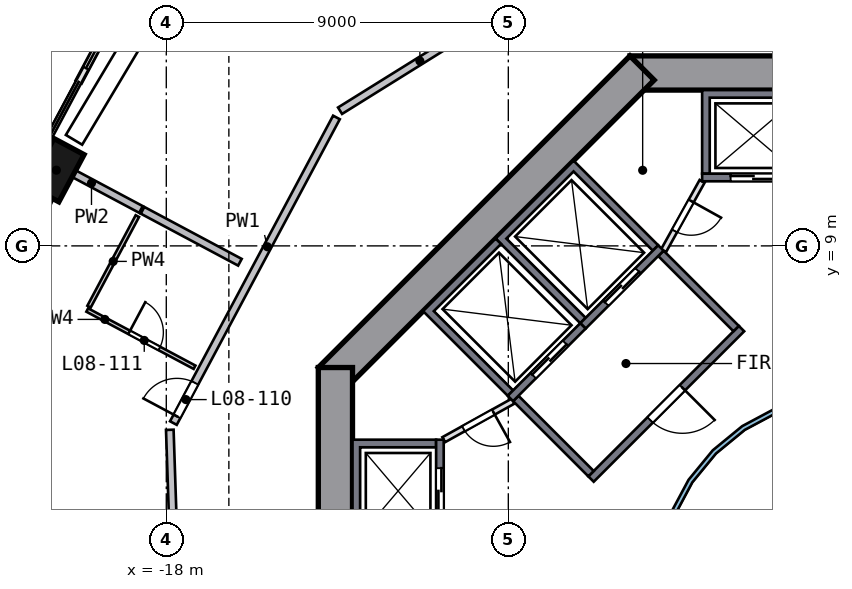
"""IFC4 building model, lengths in metres.
Left out: names, types, materials, properties, quantities, classifications, styles, units other than length and angle.
Written with IfcOpenShell. Run it as: python <this file> out.ifc"""

import sys

from ifc_helpers import new_model, si_unit, direction, frame, frame_2d, origin, origin_2d, place, context, subcontext, project, spatial, polyline, rectangle, outline, extrude, element, fill, save


model = new_model("IFC4")
c1 = context("Model", 3, precision=1e-05, world=origin(), true_north=direction((0.0, 1.0)))
c2 = subcontext(c1, "Body", "Model", "MODEL_VIEW")
j1 = project(units=[si_unit("LENGTHUNIT", "METRE"), si_unit("PLANEANGLEUNIT", "RADIAN")], contexts=[c1])
p1 = place(None, origin())
s1 = spatial("IfcSite", under=j1, at=p1, CompositionType="ELEMENT")
p2 = place(p1, origin())
s2 = spatial("IfcBuilding", under=s1, at=p2, CompositionType="ELEMENT")
p3 = place(p2, frame((0.0, 0.0, 42.5)))
s3 = spatial("IfcBuildingStorey", under=s2, at=p3, CompositionType="ELEMENT", Elevation=42.5)
p4 = place(p3, frame((-20.829, 11.113, 0.0), z_axis=(-0.052094183, -0.099549321, 0.993668017), x_axis=(-0.468171177, -0.876466072, -0.112352009)))
e1 = element("IfcColumn", 1, at=p4, inside=s3, PredefinedType="COLUMN", context=c2, shape_type="SweptSolid", body=[
    extrude(rectangle(XDim=1.4, YDim=0.9, at=origin_2d()), origin(), (0.0, 0.0, 1.0), 3.21),
])
p5 = place(p3, frame((5.799, 13.55, 0.0), z_axis=(0.0, 0.0, 1.0), x_axis=(-1.0, 0.0, 0.0)))
e2 = element("IfcWall", 2, at=p5, inside=s3, PredefinedType="SHEAR", context=c2, shape_type="SweptSolid", body=[
    extrude(rectangle(XDim=11.598, YDim=0.9, at=frame_2d((5.799, 0.0))), origin(), (0.0, 0.0, 1.0), 3.5),
])
p6 = place(p5, frame((4.899, 0.0, 0.0)))
e3 = element("IfcOpeningElement", 3, at=p6, cuts=e2, PredefinedType="OPENING", context=c2, shape_type="SweptSolid", body=[
    extrude(rectangle(XDim=1.8, YDim=2.1, at=frame_2d((0.9, 1.05))), frame((0.0, 0.46, 0.0), z_axis=(0.0, -1.0, 0.0), x_axis=(1.0, 0.0, 0.0)), (0.0, 0.0, 1.0), 0.92),
])
p7 = place(p3, frame((-5.481, 13.682, 0.0), z_axis=(0.0, 0.0, 1.0), x_axis=(-0.707106781, -0.707106781, 0.0)))
e4 = element("IfcWall", 4, at=p7, inside=s3, PredefinedType="SHEAR", context=c2, shape_type="SweptSolid", body=[
    extrude(rectangle(XDim=11.598, YDim=0.9, at=frame_2d((5.799, 0.0))), origin(), (0.0, 0.0, 1.0), 3.5),
])
p8 = place(p3, frame((-13.55, 5.799, 0.0), z_axis=(0.0, 0.0, 1.0), x_axis=(0.0, -1.0, 0.0)))
e5 = element("IfcWall", 5, at=p8, inside=s3, PredefinedType="SHEAR", context=c2, shape_type="SweptSolid", body=[
    extrude(rectangle(XDim=11.598, YDim=0.9, at=frame_2d((5.799, 0.0))), origin(), (0.0, 0.0, 1.0), 3.5),
])
p9 = place(p8, frame((4.899, 0.0, 0.0)))
e6 = element("IfcOpeningElement", 6, at=p9, cuts=e5, PredefinedType="OPENING", context=c2, shape_type="SweptSolid", body=[
    extrude(rectangle(XDim=1.8, YDim=2.1, at=frame_2d((0.9, 1.05))), frame((0.0, 0.46, 0.0), z_axis=(0.0, -1.0, 0.0), x_axis=(1.0, 0.0, 0.0)), (0.0, 0.0, 1.0), 0.92),
])
p10 = place(p3, frame((-18.324, 17.03, 0.0), z_axis=(0.0, 0.0, 1.0), x_axis=(-0.470687824, -0.88229982, 0.0)))
e7 = element("IfcWall", 7, at=p10, inside=s3, PredefinedType="SOLIDWALL", context=c2, shape_type="SweptSolid", body=[
    extrude(rectangle(XDim=4.199, YDim=0.15, at=frame_2d((2.099, 0.0))), origin(), (0.0, 0.0, 1.0), 2.425),
])
p11 = place(p10, frame((1.399, 0.0, 0.0)))
e8 = element("IfcOpeningElement", 8, at=p11, cuts=e7, PredefinedType="OPENING", context=c2, shape_type="SweptSolid", body=[
    extrude(rectangle(XDim=2.4, YDim=2.4, at=frame_2d((1.2, 1.2))), frame((0.0, 0.085, 0.0), z_axis=(0.0, -1.0, 0.0), x_axis=(1.0, 0.0, 0.0)), (0.0, 0.0, 1.0), 0.17),
])
p12 = place(p3, frame((-21.181, 18.101, 0.0), z_axis=(0.0, 0.0, 1.0), x_axis=(-0.470704182, -0.882291093, 0.0)))
e9 = element("IfcWall", 9, at=p12, inside=s3, PredefinedType="SOLIDWALL", context=c2, shape_type="SweptSolid", body=[
    extrude(rectangle(XDim=13.224, YDim=0.5, at=frame_2d((6.612, 0.0))), origin(), (0.0, 0.0, 1.0), 0.7),
])
p13 = place(p3, origin())
e10 = element("IfcWall", 10, at=p13, inside=s3, PredefinedType="SOLIDWALL", context=c2, shape_type="SweptSolid", body=[
    extrude(outline(polyline([(-3.9, 10.9), (-3.9, 13.1), (-1.2, 13.1), (-1.2, 10.9), (-1.4, 10.9), (-1.4, 12.9), (-3.7, 12.9), (-3.7, 10.9), (-3.9, 10.9)])), origin(), (0.0, 0.0, 1.0), 3.19),
])
p14 = place(p3, frame((-1.2, 10.8, 0.0), z_axis=(0.0, 0.0, 1.0), x_axis=(-1.0, 0.0, 0.0)))
e11 = element("IfcWall", 11, at=p14, inside=s3, PredefinedType="SOLIDWALL", context=c2, shape_type="SweptSolid", body=[
    extrude(rectangle(XDim=2.7, YDim=0.2, at=frame_2d((1.35, 0.0))), origin(), (0.0, 0.0, 1.0), 3.19),
])
p15 = place(p14, frame((0.75, 0.0, 0.0)))
e12 = element("IfcOpeningElement", 12, at=p15, cuts=e11, PredefinedType="OPENING", context=c2, shape_type="SweptSolid", body=[
    extrude(rectangle(XDim=1.2, YDim=2.1, at=frame_2d((0.6, 1.05))), frame((0.0, 0.11, 0.0), z_axis=(0.0, -1.0, 0.0), x_axis=(1.0, 0.0, 0.0)), (0.0, 0.0, 1.0), 0.22),
])
p16 = place(p3, origin())
e13 = element("IfcWall", 13, at=p16, inside=s3, PredefinedType="SOLIDWALL", context=c2, shape_type="SweptSolid", body=[
    extrude(outline(polyline([(-13.1, 3.9), (-10.9, 3.9), (-10.9, 3.7), (-12.9, 3.7), (-12.9, 1.4), (-10.9, 1.4), (-10.9, 1.2), (-13.1, 1.2), (-13.1, 3.9)])), origin(), (0.0, 0.0, 1.0), 3.19),
])
p17 = place(p3, frame((-10.8, 1.2, 0.0), z_axis=(0.0, 0.0, 1.0), x_axis=(0.0, 1.0, 0.0)))
e14 = element("IfcWall", 14, at=p17, inside=s3, PredefinedType="SOLIDWALL", context=c2, shape_type="SweptSolid", body=[
    extrude(rectangle(XDim=2.7, YDim=0.2, at=frame_2d((1.35, 0.0))), origin(), (0.0, 0.0, 1.0), 3.19),
])
p18 = place(p17, frame((0.75, 0.0, 0.0)))
e15 = element("IfcOpeningElement", 15, at=p18, cuts=e14, PredefinedType="OPENING", context=c2, shape_type="SweptSolid", body=[
    extrude(rectangle(XDim=1.2, YDim=2.1, at=frame_2d((0.6, 1.05))), frame((0.0, 0.11, 0.0), z_axis=(0.0, -1.0, 0.0), x_axis=(1.0, 0.0, 0.0)), (0.0, 0.0, 1.0), 0.22),
])
p19 = place(p3, origin())
e16 = element("IfcWall", 16, at=p19, inside=s3, PredefinedType="SOLIDWALL", context=c2, shape_type="SweptSolid", body=[
    extrude(outline(polyline([(-9.334, 9.192), (-7.283, 11.243), (-5.056, 9.016), (-5.197, 8.874), (-7.283, 10.96), (-9.051, 9.192), (-6.965, 7.106), (-7.106, 6.965), (-9.334, 9.192)])), origin(), (0.0, 0.0, 1.0), 3.19),
])
p20 = place(p3, frame((-4.985, 8.945, 0.0), z_axis=(0.0, 0.0, 1.0), x_axis=(-0.707106781, -0.707106781, 0.0)))
e17 = element("IfcWall", 17, at=p20, inside=s3, PredefinedType="SOLIDWALL", context=c2, shape_type="SweptSolid", body=[
    extrude(rectangle(XDim=2.9, YDim=0.2, at=frame_2d((1.45, 0.0))), origin(), (0.0, 0.0, 1.0), 3.19),
])
p21 = place(p20, frame((0.85, 0.0, 0.0)))
e18 = element("IfcOpeningElement", 18, at=p21, cuts=e17, PredefinedType="OPENING", context=c2, shape_type="SweptSolid", body=[
    extrude(rectangle(XDim=1.2, YDim=2.1, at=frame_2d((0.6, 1.05))), frame((0.0, 0.11, 0.0), z_axis=(0.0, -1.0, 0.0), x_axis=(1.0, 0.0, 0.0)), (0.0, 0.0, 1.0), 0.22),
])
p22 = place(p3, origin())
e19 = element("IfcWall", 19, at=p22, inside=s3, PredefinedType="SOLIDWALL", context=c2, shape_type="SweptSolid", body=[
    extrude(outline(polyline([(-11.243, 7.283), (-9.334, 9.192), (-9.192, 9.051), (-10.96, 7.283), (-8.874, 5.197), (-9.016, 5.056), (-11.243, 7.283)])), origin(), (0.0, 0.0, 1.0), 3.19),
])
p23 = place(p3, frame((-7.036, 6.894, 0.0), z_axis=(0.0, 0.0, 1.0), x_axis=(-0.707106781, -0.707106781, 0.0)))
e20 = element("IfcWall", 20, at=p23, inside=s3, PredefinedType="SOLIDWALL", context=c2, shape_type="SweptSolid", body=[
    extrude(rectangle(XDim=2.7, YDim=0.2, at=frame_2d((1.35, 0.0))), origin(), (0.0, 0.0, 1.0), 3.19),
])
p24 = place(p23, frame((0.65, 0.0, 0.0)))
e21 = element("IfcOpeningElement", 21, at=p24, cuts=e20, PredefinedType="OPENING", context=c2, shape_type="SweptSolid", body=[
    extrude(rectangle(XDim=1.2, YDim=2.1, at=frame_2d((0.6, 1.05))), frame((0.0, 0.11, 0.0), z_axis=(0.0, -1.0, 0.0), x_axis=(1.0, 0.0, 0.0)), (0.0, 0.0, 1.0), 0.22),
])
p25 = place(p3, frame((-2.864, 6.823, 0.0), z_axis=(0.0, 0.0, 1.0), x_axis=(-0.707106781, -0.707106781, 0.0)))
e22 = element("IfcWall", 22, at=p25, inside=s3, PredefinedType="SOLIDWALL", context=c2, shape_type="SweptSolid", body=[
    extrude(rectangle(XDim=5.6, YDim=0.2, at=frame_2d((2.8, 0.0))), origin(), (0.0, 0.0, 1.0), 3.19),
])
p26 = place(p25, frame((2.2, 0.0, 0.0)))
e23 = element("IfcOpeningElement", 23, at=p26, cuts=e22, PredefinedType="OPENING", context=c2, shape_type="SweptSolid", body=[
    extrude(rectangle(XDim=1.2, YDim=2.1, at=frame_2d((0.6, 1.05))), frame((0.0, 0.11, 0.0), z_axis=(0.0, -1.0, 0.0), x_axis=(1.0, 0.0, 0.0)), (0.0, 0.0, 1.0), 0.22),
])
for number, where, z_axis, x_axis in (
    (24, (-3.005, 6.823, 0.0), (0.0, 0.0, 1.0), (-0.707, 0.707, 0.0)),
    (25, (-6.823, 3.005, 0.0), (0.0, 0.0, 1.0), (-0.707, 0.707, 0.0)),
):
    element("IfcWall", number, at=place(p3, frame(where, z_axis=z_axis, x_axis=x_axis)), inside=s3, PredefinedType="SOLIDWALL", context=c2, shape_type="SweptSolid", body=[
        extrude(rectangle(XDim=2.8, YDim=0.2, at=frame_2d((1.4, 0.0))), origin(), (0.0, 0.0, 1.0), 3.19),
    ])
p27 = place(p3, frame((-3.9, 10.7, 0.0), z_axis=(0.0, 0.0, 1.0), x_axis=(-0.485692555, -0.874129705, 0.0)))
e26 = element("IfcWall", 26, at=p27, inside=s3, PredefinedType="PARTITIONING", context=c2, shape_type="SweptSolid", body=[
    extrude(rectangle(XDim=2.089, YDim=0.15, at=frame_2d((1.044, 0.0))), origin(), (0.0, 0.0, 1.0), 3.19),
])
p28 = place(p27, frame((0.594, 0.0, 0.0)))
e27 = element("IfcOpeningElement", 27, at=p28, cuts=e26, PredefinedType="OPENING", context=c2, shape_type="SweptSolid", body=[
    extrude(rectangle(XDim=0.9, YDim=2.1, at=frame_2d((0.45, 1.05))), frame((0.0, 0.085, 0.0), z_axis=(0.0, -1.0, 0.0), x_axis=(1.0, 0.0, 0.0)), (0.0, 0.0, 1.0), 0.17),
])
p29 = place(p3, frame((-8.874, 4.914, 0.0), z_axis=(0.0, 0.0, 1.0), x_axis=(-0.874129705, -0.485692555, 0.0)))
e28 = element("IfcWall", 28, at=p29, inside=s3, PredefinedType="PARTITIONING", context=c2, shape_type="SweptSolid", body=[
    extrude(rectangle(XDim=2.089, YDim=0.15, at=frame_2d((1.044, 0.0))), origin(), (0.0, 0.0, 1.0), 3.19),
])
p30 = place(p29, frame((0.594, 0.0, 0.0)))
e29 = element("IfcOpeningElement", 29, at=p30, cuts=e28, PredefinedType="OPENING", context=c2, shape_type="SweptSolid", body=[
    extrude(rectangle(XDim=0.9, YDim=2.1, at=frame_2d((0.45, 1.05))), frame((0.0, 0.085, 0.0), z_axis=(0.0, -1.0, 0.0), x_axis=(1.0, 0.0, 0.0)), (0.0, 0.0, 1.0), 0.17),
])
p31 = place(p3, origin())
e30 = element("IfcWall", 30, at=p31, inside=s3, PredefinedType="SOLIDWALL", context=c2, shape_type="SweptSolid", body=[
    extrude(outline(polyline([(5.021, -0.999), (4.73, -1.959), (4.257, -2.844), (3.62, -3.62), (2.844, -4.257), (1.959, -4.73), (0.999, -5.021), (0.0, -5.12), (-0.999, -5.021), (-1.959, -4.73), (-2.844, -4.257), (-3.62, -3.62), (-4.257, -2.844), (-4.73, -1.959), (-5.021, -0.999), (-5.12, 0.0), (-5.021, 0.999), (-4.73, 1.959), (-4.257, 2.844), (-3.62, 3.62), (-2.844, 4.257), (-1.959, 4.73), (-0.999, 5.021), (0.0, 5.12), (0.999, 5.021), (1.959, 4.73), (2.844, 4.257), (3.62, 3.62), (4.257, 2.844), (4.73, 1.959), (5.021, 0.999), (5.12, 0.0), (5.021, -0.999)]), holes=[polyline([(4.904, 0.976), (4.619, 1.913), (4.157, 2.778), (3.535, 3.535), (2.778, 4.157), (1.913, 4.619), (0.976, 4.904), (0.0, 5.0), (-0.976, 4.904), (-1.913, 4.619), (-2.778, 4.157), (-3.535, 3.535), (-4.157, 2.778), (-4.619, 1.913), (-4.904, 0.976), (-5.0, 0.0), (-4.904, -0.976), (-4.619, -1.913), (-4.157, -2.778), (-3.535, -3.535), (-2.778, -4.157), (-1.913, -4.619), (-0.976, -4.904), (0.0, -5.0), (0.976, -4.904), (1.913, -4.619), (2.778, -4.157), (3.535, -3.535), (4.157, -2.778), (4.619, -1.913), (4.904, -0.976), (5.0, 0.0), (4.904, 0.976)])]), origin(), (0.0, 0.0, 1.0), 3.19),
])
p32 = place(p3, frame((-17.908, 4.16, 0.0), z_axis=(0.0, 0.0, 1.0), x_axis=(0.033506179, -0.99943851, 0.0)))
e31 = element("IfcWall", 31, at=p32, inside=s3, PredefinedType="SOLIDWALL", context=c2, shape_type="SweptSolid", body=[
    extrude(rectangle(XDim=9.516, YDim=0.2, at=frame_2d((4.758, 0.0))), origin(), (0.0, 0.0, 1.0), 3.19),
])
p33 = place(p3, frame((-17.813, 4.338, 0.0), z_axis=(0.0, 0.0, 1.0), x_axis=(0.470711952, 0.882286948, 0.0)))
e32 = element("IfcWall", 32, at=p33, inside=s3, PredefinedType="SOLIDWALL", context=c2, shape_type="SweptSolid", body=[
    extrude(rectangle(XDim=9.115, YDim=0.2, at=frame_2d((4.558, 0.0))), origin(), (0.0, 0.0, 1.0), 3.19),
])
p34 = place(p33, frame((0.2, 0.0, 0.0)))
e33 = element("IfcOpeningElement", 33, at=p34, cuts=e32, PredefinedType="OPENING", context=c2, shape_type="SweptSolid", body=[
    extrude(rectangle(XDim=1.0, YDim=2.1, at=frame_2d((0.5, 1.05))), frame((0.0, 0.11, 0.0), z_axis=(0.0, -1.0, 0.0), x_axis=(1.0, 0.0, 0.0)), (0.0, 0.0, 1.0), 0.22),
])
p35 = place(p3, frame((-13.428, 12.557, 0.0), z_axis=(0.0, 0.0, 1.0), x_axis=(0.848780633, 0.528745154, 0.0)))
e34 = element("IfcWall", 34, at=p35, inside=s3, PredefinedType="SOLIDWALL", context=c2, shape_type="SweptSolid", body=[
    extrude(rectangle(XDim=9.316, YDim=0.2, at=frame_2d((4.658, 0.0))), origin(), (0.0, 0.0, 1.0), 3.19),
])
p36 = place(p35, frame((5.15, 0.0, 0.0)))
e35 = element("IfcOpeningElement", 35, at=p36, cuts=e34, PredefinedType="OPENING", context=c2, shape_type="SweptSolid", body=[
    extrude(rectangle(XDim=1.0, YDim=2.1, at=frame_2d((0.5, 1.05))), frame((0.0, 0.11, 0.0), z_axis=(0.0, -1.0, 0.0), x_axis=(1.0, 0.0, 0.0)), (0.0, 0.0, 1.0), 0.22),
])
p37 = place(p3, frame((-18.666, 9.958, 0.0), z_axis=(0.0, 0.0, 1.0), x_axis=(-0.882304858, 0.470678379, 0.0)))
e36 = element("IfcWall", 36, at=p37, inside=s3, PredefinedType="SOLIDWALL", context=c2, shape_type="SweptSolid", body=[
    extrude(rectangle(XDim=2.952, YDim=0.2, at=frame_2d((1.476, 0.0))), origin(), (0.0, 0.0, 1.0), 3.19),
])
p38 = place(p3, frame((-16.062, 8.569, 0.0), z_axis=(0.0, 0.0, 1.0), x_axis=(-0.882280811, 0.470723454, 0.0)))
e37 = element("IfcWall", 37, at=p38, inside=s3, PredefinedType="SOLIDWALL", context=c2, shape_type="SweptSolid", body=[
    extrude(rectangle(XDim=2.905, YDim=0.2, at=frame_2d((1.453, 0.0))), origin(), (0.0, 0.0, 1.0), 3.19),
])
p39 = place(p3, frame((-20.033, 7.401, 0.0), z_axis=(0.0, 0.0, 1.0), x_axis=(0.470710247, 0.882287858, 0.0)))
e38 = element("IfcWall", 38, at=p39, inside=s3, PredefinedType="PARTITIONING", context=c2, shape_type="SweptSolid", body=[
    extrude(rectangle(XDim=2.7, YDim=0.1, at=frame_2d((1.35, 0.0))), origin(), (0.0, 0.0, 1.0), 3.19),
])
p40 = place(p3, frame((-20.08, 7.312, 0.0), z_axis=(0.0, 0.0, 1.0), x_axis=(0.882272674, -0.470738706, 0.0)))
e39 = element("IfcWall", 39, at=p40, inside=s3, PredefinedType="PARTITIONING", context=c2, shape_type="SweptSolid", body=[
    extrude(rectangle(XDim=3.2, YDim=0.1, at=frame_2d((1.6, 0.0))), origin(), (0.0, 0.0, 1.0), 3.19),
])
p41 = place(p40, frame((1.25, 0.0, 0.0)))
e40 = element("IfcOpeningElement", 40, at=p41, cuts=e39, PredefinedType="OPENING", context=c2, shape_type="SweptSolid", body=[
    extrude(rectangle(XDim=0.9, YDim=2.1, at=frame_2d((0.45, 1.05))), frame((0.0, 0.06, 0.0), z_axis=(0.0, -1.0, 0.0), x_axis=(1.0, 0.0, 0.0)), (0.0, 0.0, 1.0), 0.12),
])
p42 = place(p11, origin())
e41 = element("IfcDoor", 41, at=p42, inside=s3, OperationType="SLIDING_TO_LEFT", PredefinedType="DOOR", context=c2, shape_type="SweptSolid", body=[
    extrude(rectangle(XDim=2.4, YDim=2.4, at=frame_2d((1.2, 1.2))), frame((0.0, 0.025, 0.0), z_axis=(0.0, -1.0, 0.0), x_axis=(1.0, 0.0, 0.0)), (0.0, 0.0, 1.0), 0.05),
])
fill(e8, e41)
p43 = place(p15, origin())
e42 = element("IfcDoor", 42, at=p43, inside=s3, OperationType="DOUBLE_DOOR_SLIDING", PredefinedType="DOOR", context=c2, shape_type="SweptSolid", body=[
    extrude(rectangle(XDim=1.2, YDim=2.1, at=frame_2d((0.6, 1.05))), frame((0.0, 0.025, 0.0), z_axis=(0.0, -1.0, 0.0), x_axis=(1.0, 0.0, 0.0)), (0.0, 0.0, 1.0), 0.05),
])
fill(e12, e42)
p44 = place(p18, origin())
e43 = element("IfcDoor", 43, at=p44, inside=s3, OperationType="DOUBLE_DOOR_SLIDING", PredefinedType="DOOR", context=c2, shape_type="SweptSolid", body=[
    extrude(rectangle(XDim=1.2, YDim=2.1, at=frame_2d((0.6, 1.05))), frame((0.0, 0.025, 0.0), z_axis=(0.0, -1.0, 0.0), x_axis=(1.0, 0.0, 0.0)), (0.0, 0.0, 1.0), 0.05),
])
fill(e15, e43)
p45 = place(p21, origin())
e44 = element("IfcDoor", 44, at=p45, inside=s3, OperationType="DOUBLE_DOOR_SLIDING", PredefinedType="DOOR", context=c2, shape_type="SweptSolid", body=[
    extrude(rectangle(XDim=1.2, YDim=2.1, at=frame_2d((0.6, 1.05))), frame((0.0, 0.025, 0.0), z_axis=(0.0, -1.0, 0.0), x_axis=(1.0, 0.0, 0.0)), (0.0, 0.0, 1.0), 0.05),
])
fill(e18, e44)
p46 = place(p24, origin())
e45 = element("IfcDoor", 45, at=p46, inside=s3, OperationType="DOUBLE_DOOR_SLIDING", PredefinedType="DOOR", context=c2, shape_type="SweptSolid", body=[
    extrude(rectangle(XDim=1.2, YDim=2.1, at=frame_2d((0.6, 1.05))), frame((0.0, 0.025, 0.0), z_axis=(0.0, -1.0, 0.0), x_axis=(1.0, 0.0, 0.0)), (0.0, 0.0, 1.0), 0.05),
])
fill(e21, e45)
p47 = place(p26, origin())
e46 = element("IfcDoor", 46, at=p47, inside=s3, OperationType="SINGLE_SWING_LEFT", PredefinedType="DOOR", context=c2, shape_type="SweptSolid", body=[
    extrude(rectangle(XDim=1.2, YDim=2.1, at=frame_2d((0.6, 1.05))), frame((0.0, 0.025, 0.0), z_axis=(0.0, -1.0, 0.0), x_axis=(1.0, 0.0, 0.0)), (0.0, 0.0, 1.0), 0.05),
])
fill(e23, e46)
p48 = place(p28, origin())
e47 = element("IfcDoor", 47, at=p48, inside=s3, OperationType="SINGLE_SWING_LEFT", PredefinedType="DOOR", context=c2, shape_type="SweptSolid", body=[
    extrude(rectangle(XDim=0.9, YDim=2.1, at=frame_2d((0.45, 1.05))), frame((0.0, 0.025, 0.0), z_axis=(0.0, -1.0, 0.0), x_axis=(1.0, 0.0, 0.0)), (0.0, 0.0, 1.0), 0.05),
])
fill(e27, e47)
p49 = place(p30, origin())
e48 = element("IfcDoor", 48, at=p49, inside=s3, OperationType="SINGLE_SWING_LEFT", PredefinedType="DOOR", context=c2, shape_type="SweptSolid", body=[
    extrude(rectangle(XDim=0.9, YDim=2.1, at=frame_2d((0.45, 1.05))), frame((0.0, 0.025, 0.0), z_axis=(0.0, -1.0, 0.0), x_axis=(1.0, 0.0, 0.0)), (0.0, 0.0, 1.0), 0.05),
])
fill(e29, e48)
p50 = place(p34, origin())
e49 = element("IfcDoor", 49, at=p50, inside=s3, OperationType="SINGLE_SWING_LEFT", PredefinedType="DOOR", context=c2, shape_type="SweptSolid", body=[
    extrude(rectangle(XDim=1.0, YDim=2.1, at=frame_2d((0.5, 1.05))), frame((0.0, 0.025, 0.0), z_axis=(0.0, -1.0, 0.0), x_axis=(1.0, 0.0, 0.0)), (0.0, 0.0, 1.0), 0.05),
])
fill(e33, e49)
p51 = place(p41, origin())
e50 = element("IfcDoor", 50, at=p51, inside=s3, OperationType="SINGLE_SWING_LEFT", PredefinedType="DOOR", context=c2, shape_type="SweptSolid", body=[
    extrude(rectangle(XDim=0.9, YDim=2.1, at=frame_2d((0.45, 1.05))), frame((0.0, 0.025, 0.0), z_axis=(0.0, -1.0, 0.0), x_axis=(1.0, 0.0, 0.0)), (0.0, 0.0, 1.0), 0.05),
])
fill(e40, e50)
save(model, sys.argv[1])
